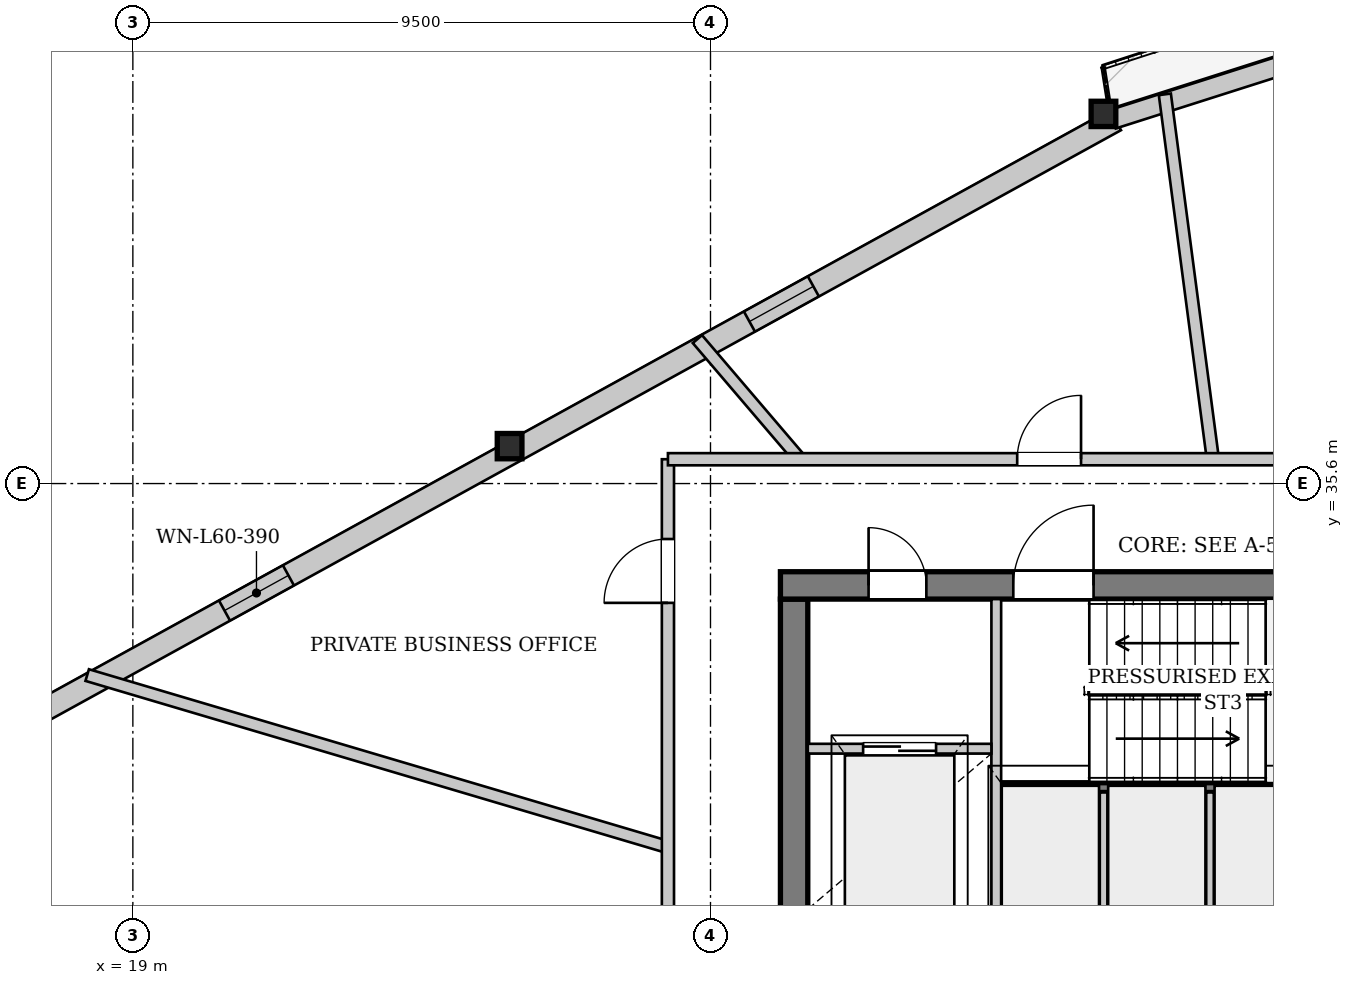
"""IFC4 building model, lengths in metres.
Left out: names, types, materials, properties, quantities, classifications, styles, units other than length and angle.
Written with IfcOpenShell. Run it as: python <this file> out.ifc"""

import sys

from ifc_helpers import new_model, si_unit, direction, frame, frame_2d, origin, origin_2d, place, context, subcontext, project, spatial, rectangle, i_section, extrude, source, transform, mapped, element, fill, save


model = new_model("IFC4")
c1 = context("Model", 3, precision=1e-05, world=origin(), true_north=direction((0.0, 1.0)))
c2 = subcontext(c1, "Body", "Model", "MODEL_VIEW")
j1 = project(units=[si_unit("LENGTHUNIT", "METRE"), si_unit("PLANEANGLEUNIT", "RADIAN")], contexts=[c1])
p1 = place(None, origin())
s1 = spatial("IfcSite", under=j1, at=p1, CompositionType="ELEMENT")
p2 = place(p1, origin())
s2 = spatial("IfcBuilding", under=s1, at=p2, CompositionType="ELEMENT")
p3 = place(p2, frame((0.0, 0.0, 227.35)))
s3 = spatial("IfcBuildingStorey", under=s2, at=p3, CompositionType="ELEMENT", Elevation=227.35)
m1 = source(origin(), c2, "Body", "SweptSolid", [
    extrude(i_section(OverallWidth=0.406, OverallDepth=0.416, WebThickness=0.027, FlangeThickness=0.042, at=origin_2d()), origin(), (0.0, 0.0, 1.0), 3.394),
])
p4 = place(p3, frame((35.068, 41.744, 0.0), z_axis=(-0.062077161408, -0.038339660522, 0.997334696309), x_axis=(0.525471891343, -0.85081096103, 0.0)))
e1 = element("IfcColumn", 1, at=p4, inside=s3, PredefinedType="COLUMN", context=c2, shape_type="MappedRepresentation", body=[
    mapped(m1, transform((0.0, 0.0, 0.0), x_axis=(1.0, 0.0, 0.0), y_axis=(0.0, 1.0, 0.0), z_axis=(0.0, 0.0, 1.0), scale=1.0)),
])
m2 = source(origin(), c2, "Body", "SweptSolid", [
    extrude(i_section(OverallWidth=0.406, OverallDepth=0.416, WebThickness=0.027, FlangeThickness=0.042, at=origin_2d()), origin(), (0.0, 0.0, 1.0), 3.397),
])
p5 = place(p3, frame((25.258, 36.343, 0.0), z_axis=(-0.036582217697, -0.075320558244, 0.996488110744), x_axis=(0.899517796015, -0.436884120393, 0.0)))
e2 = element("IfcColumn", 2, at=p5, inside=s3, PredefinedType="COLUMN", context=c2, shape_type="MappedRepresentation", body=[
    mapped(m2, transform((0.0, 0.0, 0.0), x_axis=(1.0, 0.0, 0.0), y_axis=(0.0, 1.0, 0.0), z_axis=(0.0, 0.0, 1.0), scale=1.0)),
])
p6 = place(p3, frame((15.539, 30.776, 0.0), z_axis=(0.0, 0.0, 1.0), x_axis=(0.876021364286, 0.482272297892, 0.0)))
e3 = element("IfcWall", 3, at=p6, inside=s3, PredefinedType="SOLIDWALL", context=c2, shape_type="SweptSolid", body=[
    extrude(rectangle(XDim=22.397, YDim=0.38, at=frame_2d((11.199, 0.0))), origin(), (0.0, 0.0, 1.0), 2.822),
])
p7 = place(p6, frame((5.671, 0.0, 0.65)))
e4 = element("IfcOpeningElement", 4, at=p7, cuts=e3, PredefinedType="OPENING", context=c2, shape_type="SweptSolid", body=[
    extrude(rectangle(XDim=1.2, YDim=1.5, at=frame_2d((0.6, 0.75))), frame((0.0, 0.2, 0.0), z_axis=(0.0, -1.0, 0.0), x_axis=(1.0, 0.0, 0.0)), (0.0, 0.0, 1.0), 0.4),
])
p8 = place(p6, frame((15.526, 0.0, 0.65)))
e5 = element("IfcOpeningElement", 5, at=p8, cuts=e3, PredefinedType="OPENING", context=c2, shape_type="SweptSolid", body=[
    extrude(rectangle(XDim=1.2, YDim=1.5, at=frame_2d((0.6, 0.75))), frame((0.0, 0.2, 0.0), z_axis=(0.0, -1.0, 0.0), x_axis=(1.0, 0.0, 0.0)), (0.0, 0.0, 1.0), 0.4),
])
p9 = place(p3, frame((35.117, 41.592, 0.0), z_axis=(0.0, 0.0, 1.0), x_axis=(0.952805881392, 0.303580223968, 0.0)))
e6 = element("IfcWall", 6, at=p9, inside=s3, PredefinedType="SOLIDWALL", context=c2, shape_type="SweptSolid", body=[
    extrude(rectangle(XDim=22.397, YDim=0.32, at=frame_2d((11.199, 0.0))), origin(), (0.0, 0.0, 1.0), 2.822),
])
p10 = place(p9, frame((6.417, 0.0, 0.0)))
e7 = element("IfcOpeningElement", 7, at=p10, cuts=e6, PredefinedType="OPENING", context=c2, shape_type="SweptSolid", body=[
    extrude(rectangle(XDim=1.5, YDim=2.3, at=frame_2d((0.75, 1.15))), frame((0.0, 0.17, 0.0), z_axis=(0.0, -1.0, 0.0), x_axis=(1.0, 0.0, 0.0)), (0.0, 0.0, 1.0), 0.34),
])
p11 = place(p9, frame((15.274, 0.0, 0.352)))
e8 = element("IfcOpeningElement", 8, at=p11, cuts=e6, PredefinedType="OPENING", context=c2, shape_type="SweptSolid", body=[
    extrude(rectangle(XDim=2.6, YDim=2.35, at=frame_2d((1.3, 1.175))), frame((0.0, 0.17, 0.0), z_axis=(0.0, -1.0, 0.0), x_axis=(1.0, 0.0, 0.0)), (0.0, 0.0, 1.0), 0.34),
])
p12 = place(p3, frame((29.875, 19.5, 0.0), z_axis=(0.0, 0.0, 1.0), x_axis=(0.0, 1.0, 0.0)))
e9 = element("IfcWall", 9, at=p12, inside=s3, PredefinedType="SHEAR", context=c2, shape_type="SweptSolid", body=[
    extrude(rectangle(XDim=14.2, YDim=0.45, at=frame_2d((7.1, 0.0))), origin(), (0.0, 0.0, 1.0), 3.33),
])
p13 = place(p12, frame((7.42, 0.0, 0.0)))
e10 = element("IfcOpeningElement", 10, at=p13, cuts=e9, PredefinedType="OPENING", context=c2, shape_type="SweptSolid", body=[
    extrude(rectangle(XDim=1.6, YDim=2.2, at=frame_2d((0.8, 1.1))), frame((0.0, 0.235, 0.0), z_axis=(0.0, -1.0, 0.0), x_axis=(1.0, 0.0, 0.0)), (0.0, 0.0, 1.0), 0.47),
])
p14 = place(p3, frame((29.65, 33.925, 0.0), z_axis=(0.0, 0.0, 1.0), x_axis=(1.0, 0.0, 0.0)))
e11 = element("IfcWall", 11, at=p14, inside=s3, PredefinedType="SHEAR", context=c2, shape_type="SweptSolid", body=[
    extrude(rectangle(XDim=16.7, YDim=0.45, at=frame_2d((8.35, 0.0))), origin(), (0.0, 0.0, 1.0), 3.33),
])
p15 = place(p14, frame((1.45, 0.0, 0.0)))
e12 = element("IfcOpeningElement", 12, at=p15, cuts=e11, PredefinedType="OPENING", context=c2, shape_type="SweptSolid", body=[
    extrude(rectangle(XDim=0.95, YDim=2.1, at=frame_2d((0.475, 1.05))), frame((0.0, 0.235, 0.0), z_axis=(0.0, -1.0, 0.0), x_axis=(1.0, 0.0, 0.0)), (0.0, 0.0, 1.0), 0.47),
])
p16 = place(p14, frame((3.83, 0.0, 0.0)))
e13 = element("IfcOpeningElement", 13, at=p16, cuts=e11, PredefinedType="OPENING", context=c2, shape_type="SweptSolid", body=[
    extrude(rectangle(XDim=1.32, YDim=2.2, at=frame_2d((0.66, 1.1))), frame((0.0, 0.235, 0.0), z_axis=(0.0, -1.0, 0.0), x_axis=(1.0, 0.0, 0.0)), (0.0, 0.0, 1.0), 0.47),
])
p17 = place(p3, frame((33.28, 30.6, 0.0), z_axis=(0.0, 0.0, 1.0), x_axis=(1.0, 0.0, 0.0)))
e14 = element("IfcWall", 14, at=p17, inside=s3, PredefinedType="PARTITIONING", context=c2, shape_type="SweptSolid", body=[
    extrude(rectangle(XDim=7.3, YDim=0.16, at=frame_2d((3.65, 0.0))), origin(), (0.0, 0.0, 1.0), 3.33),
])
p18 = place(p3, frame((33.2, 28.44, 0.0), z_axis=(0.0, 0.0, 1.0), x_axis=(0.0, 1.0, 0.0)))
e15 = element("IfcWall", 15, at=p18, inside=s3, PredefinedType="PARTITIONING", context=c2, shape_type="SweptSolid", body=[
    extrude(rectangle(XDim=5.26, YDim=0.16, at=frame_2d((2.63, 0.0))), origin(), (0.0, 0.0, 1.0), 3.33),
])
p19 = place(p3, frame((30.1, 31.24, 0.0), z_axis=(0.0, 0.0, 1.0), x_axis=(1.0, 0.0, 0.0)))
e16 = element("IfcWall", 16, at=p19, inside=s3, PredefinedType="PARTITIONING", context=c2, shape_type="SweptSolid", body=[
    extrude(rectangle(XDim=3.02, YDim=0.16, at=frame_2d((1.51, 0.0))), origin(), (0.0, 0.0, 1.0), 3.33),
])
p20 = place(p19, frame((0.91, 0.0, 0.0)))
e17 = element("IfcOpeningElement", 17, at=p20, cuts=e16, PredefinedType="OPENING", context=c2, shape_type="SweptSolid", body=[
    extrude(rectangle(XDim=1.2, YDim=2.2, at=frame_2d((0.6, 1.1))), frame((0.0, 0.09, 0.0), z_axis=(0.0, -1.0, 0.0), x_axis=(1.0, 0.0, 0.0)), (0.0, 0.0, 1.0), 0.18),
])
for number, where, z_axis, x_axis in (
    (18, (34.965, 28.6, 0.0), (0.0, 0.0, 1.0), (0.0, 1.0, 0.0)),
    (19, (36.715, 28.6, 0.0), (0.0, 0.0, 1.0), (0.0, 1.0, 0.0)),
):
    element("IfcWall", number, at=place(p3, frame(where, z_axis=z_axis, x_axis=x_axis)), inside=s3, PredefinedType="PARTITIONING", context=c2, shape_type="SweptSolid", body=[
        extrude(rectangle(XDim=1.92, YDim=0.125, at=frame_2d((0.96, 0.0))), origin(), (0.0, 0.0, 1.0), 3.33),
    ])
p21 = place(p3, frame((36.762, 36.0, 0.0), z_axis=(0.0, 0.0, 1.0), x_axis=(-0.130530683029, 0.991444270137, 0.0)))
e20 = element("IfcWall", 20, at=p21, inside=s3, PredefinedType="PARTITIONING", context=c2, shape_type="SweptSolid", body=[
    extrude(rectangle(XDim=6.052, YDim=0.2, at=frame_2d((3.026, 0.0))), origin(), (0.0, 0.0, 1.0), 3.33),
])
p22 = place(p3, frame((29.972, 36.0, 0.0), z_axis=(0.0, 0.0, 1.0), x_axis=(-0.649428113656, 0.760422990968, 0.0)))
e21 = element("IfcWall", 21, at=p22, inside=s3, PredefinedType="PARTITIONING", context=c2, shape_type="SweptSolid", body=[
    extrude(rectangle(XDim=2.598, YDim=0.2, at=frame_2d((1.299, 0.0))), origin(), (0.0, 0.0, 1.0), 3.33),
])
p23 = place(p3, frame((27.8, 29.621, 0.0), z_axis=(0.0, 0.0, 1.0), x_axis=(-0.958820857055, 0.284011556237, 0.0)))
e22 = element("IfcWall", 22, at=p23, inside=s3, PredefinedType="PARTITIONING", context=c2, shape_type="SweptSolid", body=[
    extrude(rectangle(XDim=9.961, YDim=0.2, at=frame_2d((4.98, 0.0))), origin(), (0.0, 0.0, 1.0), 3.33),
])
p24 = place(p3, frame((27.8, 17.2, 0.0), z_axis=(0.0, 0.0, 1.0), x_axis=(0.0, 1.0, 0.0)))
e23 = element("IfcWall", 23, at=p24, inside=s3, PredefinedType="PARTITIONING", context=c2, shape_type="SweptSolid", body=[
    extrude(rectangle(XDim=18.8, YDim=0.2, at=frame_2d((9.4, 0.0))), origin(), (0.0, 0.0, 1.0), 3.33),
])
p25 = place(p24, frame((16.438, 0.0, 0.0)))
e24 = element("IfcOpeningElement", 24, at=p25, cuts=e23, PredefinedType="OPENING", context=c2, shape_type="SweptSolid", body=[
    extrude(rectangle(XDim=1.05, YDim=2.2, at=frame_2d((0.525, 1.1))), frame((0.0, 0.11, 0.0), z_axis=(0.0, -1.0, 0.0), x_axis=(1.0, 0.0, 0.0)), (0.0, 0.0, 1.0), 0.22),
])
p26 = place(p24, frame((7.689, 0.0, 0.0)))
e25 = element("IfcOpeningElement", 25, at=p26, cuts=e23, PredefinedType="OPENING", context=c2, shape_type="SweptSolid", body=[
    extrude(rectangle(XDim=1.05, YDim=2.2, at=frame_2d((0.525, 1.1))), frame((0.0, 0.11, 0.0), z_axis=(0.0, -1.0, 0.0), x_axis=(1.0, 0.0, 0.0)), (0.0, 0.0, 1.0), 0.22),
])
p27 = place(p24, frame((1.495, 0.0, 0.0)))
e26 = element("IfcOpeningElement", 26, at=p27, cuts=e23, PredefinedType="OPENING", context=c2, shape_type="SweptSolid", body=[
    extrude(rectangle(XDim=1.05, YDim=2.2, at=frame_2d((0.525, 1.1))), frame((0.0, 0.11, 0.0), z_axis=(0.0, -1.0, 0.0), x_axis=(1.0, 0.0, 0.0)), (0.0, 0.0, 1.0), 0.22),
])
p28 = place(p3, frame((27.8, 36.0, 0.0), z_axis=(0.0, 0.0, 1.0), x_axis=(1.0, 0.0, 0.0)))
e27 = element("IfcWall", 27, at=p28, inside=s3, PredefinedType="PARTITIONING", context=c2, shape_type="SweptSolid", body=[
    extrude(rectangle(XDim=13.2, YDim=0.2, at=frame_2d((6.6, 0.0))), origin(), (0.0, 0.0, 1.0), 3.33),
])
p29 = place(p28, frame((11.798, 0.0, 0.0)))
e28 = element("IfcOpeningElement", 28, at=p29, cuts=e27, PredefinedType="OPENING", context=c2, shape_type="SweptSolid", body=[
    extrude(rectangle(XDim=1.05, YDim=2.2, at=frame_2d((0.525, 1.1))), frame((0.0, 0.11, 0.0), z_axis=(0.0, -1.0, 0.0), x_axis=(1.0, 0.0, 0.0)), (0.0, 0.0, 1.0), 0.22),
])
p30 = place(p28, frame((5.744, 0.0, 0.0)))
e29 = element("IfcOpeningElement", 29, at=p30, cuts=e27, PredefinedType="OPENING", context=c2, shape_type="SweptSolid", body=[
    extrude(rectangle(XDim=1.05, YDim=2.2, at=frame_2d((0.525, 1.1))), frame((0.0, 0.11, 0.0), z_axis=(0.0, -1.0, 0.0), x_axis=(1.0, 0.0, 0.0)), (0.0, 0.0, 1.0), 0.22),
])
m3 = source(origin(), c2, "Body", "SweptSolid", [
    extrude(rectangle(XDim=1.2, YDim=1.5, at=frame_2d((0.6, 0.75))), frame((0.0, 0.03, 0.0), z_axis=(0.0, -1.0, 0.0), x_axis=(1.0, 0.0, 0.0)), (0.0, 0.0, 1.0), 0.06),
])
p31 = place(p7, origin())
e30 = element("IfcWindow", 30, at=p31, inside=s3, PartitioningType="SINGLE_PANEL", PredefinedType="WINDOW", context=c2, shape_type="MappedRepresentation", body=[
    mapped(m3, transform((0.0, 0.0, 0.0), x_axis=(1.0, 0.0, 0.0), y_axis=(0.0, 1.0, 0.0), z_axis=(0.0, 0.0, 1.0), scale=1.0)),
])
fill(e4, e30)
p32 = place(p8, origin())
e31 = element("IfcWindow", 31, at=p32, inside=s3, PartitioningType="SINGLE_PANEL", PredefinedType="WINDOW", context=c2, shape_type="MappedRepresentation", body=[
    mapped(m3, transform((0.0, 0.0, 0.0), x_axis=(1.0, 0.0, 0.0), y_axis=(0.0, 1.0, 0.0), z_axis=(0.0, 0.0, 1.0), scale=1.0)),
])
fill(e5, e31)
m4 = source(origin(), c2, "Body", "SweptSolid", [
    extrude(rectangle(XDim=0.95, YDim=2.1, at=frame_2d((0.475, 1.05))), frame((0.0, 0.025, 0.0), z_axis=(0.0, -1.0, 0.0), x_axis=(1.0, 0.0, 0.0)), (0.0, 0.0, 1.0), 0.05),
])
p33 = place(p15, origin())
e32 = element("IfcDoor", 32, at=p33, inside=s3, OperationType="SINGLE_SWING_LEFT", PredefinedType="DOOR", context=c2, shape_type="MappedRepresentation", body=[
    mapped(m4, transform((0.0, 0.0, 0.0), x_axis=(1.0, 0.0, 0.0), y_axis=(0.0, 1.0, 0.0), z_axis=(0.0, 0.0, 1.0), scale=1.0)),
])
fill(e12, e32)
m5 = source(origin(), c2, "Body", "SweptSolid", [
    extrude(rectangle(XDim=1.32, YDim=2.2, at=frame_2d((0.66, 1.1))), frame((0.0, 0.025, 0.0), z_axis=(0.0, -1.0, 0.0), x_axis=(1.0, 0.0, 0.0)), (0.0, 0.0, 1.0), 0.05),
])
p34 = place(p16, origin())
e33 = element("IfcDoor", 33, at=p34, inside=s3, OperationType="SINGLE_SWING_RIGHT", PredefinedType="DOOR", context=c2, shape_type="MappedRepresentation", body=[
    mapped(m5, transform((0.0, 0.0, 0.0), x_axis=(1.0, 0.0, 0.0), y_axis=(0.0, 1.0, 0.0), z_axis=(0.0, 0.0, 1.0), scale=1.0)),
])
fill(e13, e33)
m6 = source(origin(), c2, "Body", "SweptSolid", [
    extrude(rectangle(XDim=1.2, YDim=2.2, at=frame_2d((0.6, 1.1))), frame((0.0, 0.025, 0.0), z_axis=(0.0, -1.0, 0.0), x_axis=(1.0, 0.0, 0.0)), (0.0, 0.0, 1.0), 0.05),
])
p35 = place(p20, origin())
e34 = element("IfcDoor", 34, at=p35, inside=s3, OperationType="DOUBLE_DOOR_SLIDING", PredefinedType="DOOR", context=c2, shape_type="MappedRepresentation", body=[
    mapped(m6, transform((0.0, 0.0, 0.0), x_axis=(1.0, 0.0, 0.0), y_axis=(0.0, 1.0, 0.0), z_axis=(0.0, 0.0, 1.0), scale=1.0)),
])
fill(e17, e34)
m7 = source(origin(), c2, "Body", "SweptSolid", [
    extrude(rectangle(XDim=1.05, YDim=2.2, at=frame_2d((0.525, 1.1))), frame((0.0, 0.025, 0.0), z_axis=(0.0, -1.0, 0.0), x_axis=(1.0, 0.0, 0.0)), (0.0, 0.0, 1.0), 0.05),
])
p36 = place(p25, origin())
e35 = element("IfcDoor", 35, at=p36, inside=s3, OperationType="SINGLE_SWING_LEFT", PredefinedType="DOOR", context=c2, shape_type="MappedRepresentation", body=[
    mapped(m7, transform((0.0, 0.0, 0.0), x_axis=(1.0, 0.0, 0.0), y_axis=(0.0, 1.0, 0.0), z_axis=(0.0, 0.0, 1.0), scale=1.0)),
])
fill(e24, e35)
p37 = place(p30, origin())
e36 = element("IfcDoor", 36, at=p37, inside=s3, OperationType="SINGLE_SWING_RIGHT", PredefinedType="DOOR", context=c2, shape_type="MappedRepresentation", body=[
    mapped(m7, transform((0.0, 0.0, 0.0), x_axis=(1.0, 0.0, 0.0), y_axis=(0.0, 1.0, 0.0), z_axis=(0.0, 0.0, 1.0), scale=1.0)),
])
fill(e29, e36)
save(model, sys.argv[1])
